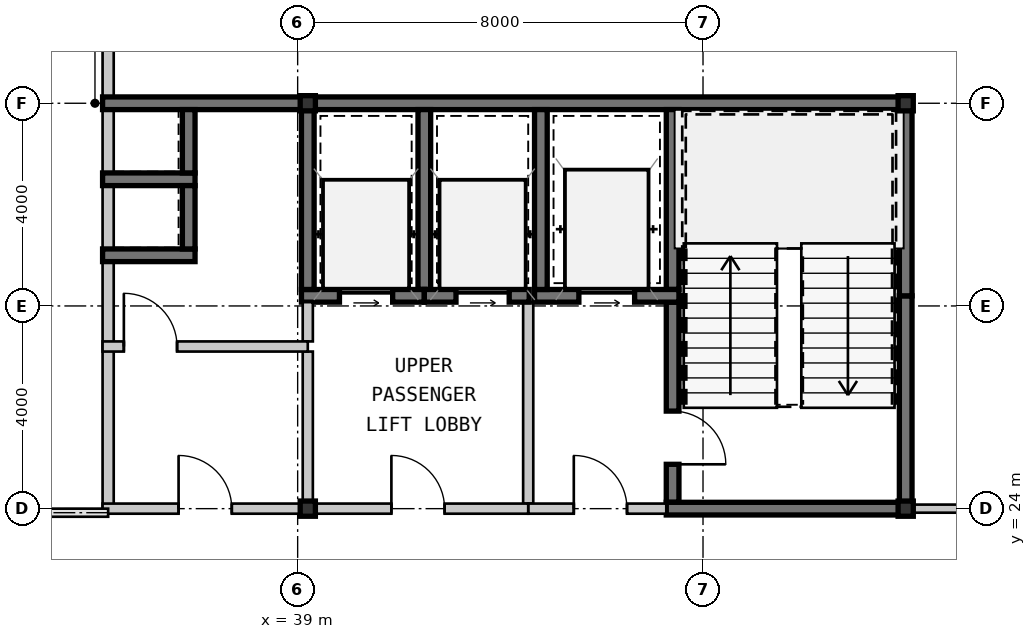
"""IFC4 building model, lengths in metres.
Left out: names, types, materials, properties, quantities, classifications, styles, units other than length and angle.
Written with IfcOpenShell. Run it as: python <this file> out.ifc"""

import sys

from ifc_helpers import new_model, si_unit, direction, frame, frame_2d, origin, origin_2d, place, context, subcontext, project, spatial, rectangle, hollow_rectangle, extrude, source, transform, mapped, element, fill, save


model = new_model("IFC4")
c1 = context("Model", 3, precision=1e-05, world=origin(), true_north=direction((0.0, 1.0)))
c2 = subcontext(c1, "Body", "Model", "MODEL_VIEW")
j1 = project(units=[si_unit("LENGTHUNIT", "METRE"), si_unit("PLANEANGLEUNIT", "RADIAN")], contexts=[c1])
p1 = place(None, origin())
s1 = spatial("IfcSite", under=j1, at=p1, CompositionType="ELEMENT")
p2 = place(p1, origin())
s2 = spatial("IfcBuilding", under=s1, at=p2, CompositionType="ELEMENT")
p3 = place(p2, frame((0.0, 0.0, 227.15)))
s3 = spatial("IfcBuildingStorey", under=s2, at=p3, CompositionType="ELEMENT", Elevation=227.15)
m1 = source(origin(), c2, "Body", "SweptSolid", [
    extrude(hollow_rectangle(XDim=0.3, YDim=0.3, WallThickness=0.012, at=origin_2d()), origin(), (0.0, 0.0, 1.0), 3.15),
])
for number, where, z_axis, x_axis in (
    (1, (39.2, 24.0, 0.0), (0.0, 0.0, 1.0), (1.0, 0.0, 0.0)),
    (2, (51.0, 24.0, 0.0), (0.0, 0.0, 1.0), (1.0, 0.0, 0.0)),
    (3, (39.2, 32.0, 0.0), (0.0, 0.0, 1.0), (1.0, 0.0, 0.0)),
    (4, (51.0, 32.0, 0.0), (0.0, 0.0, 1.0), (1.0, 0.0, 0.0)),
):
    element("IfcColumn", number, at=place(p3, frame(where, z_axis=z_axis, x_axis=x_axis)), inside=s3, PredefinedType="COLUMN", context=c2, shape_type="MappedRepresentation", body=[
        mapped(m1, transform((0.0, 0.0, 0.0), scale=1.0)),
    ])
m2 = source(origin(), c2, "Body", "SweptSolid", [
    extrude(rectangle(XDim=11.964, YDim=0.22, at=frame_2d((5.982, 0.0))), origin(), (0.0, 0.0, 1.0), 2.93),
])
p4 = place(p3, frame((35.26, 35.884, 0.0), z_axis=(0.0, 0.0, 1.0), x_axis=(0.0, -1.0, 0.0)))
e5 = element("IfcWall", 5, at=p4, inside=s3, PredefinedType="SOLIDWALL", context=c2, shape_type="MappedRepresentation", body=[
    mapped(m2, transform((0.0, 0.0, 0.0), scale=1.0)),
])
m3 = source(origin(), c2, "Body", "SweptSolid", [
    extrude(rectangle(XDim=4.05, YDim=0.25, at=frame_2d((2.025, 0.0))), origin(), (0.0, 0.0, 1.0), 2.93),
])
p5 = place(p3, frame((35.15, 32.0, 0.0), z_axis=(0.0, 0.0, 1.0), x_axis=(1.0, 0.0, 0.0)))
e6 = element("IfcWall", 6, at=p5, inside=s3, PredefinedType="SHEAR", context=c2, shape_type="MappedRepresentation", body=[
    mapped(m3, transform((0.0, 0.0, 0.0), scale=1.0)),
])
m4 = source(origin(), c2, "Body", "SweptSolid", [
    extrude(rectangle(XDim=11.925, YDim=0.25, at=frame_2d((5.962, 0.0))), origin(), (0.0, 0.0, 1.0), 2.93),
])
p6 = place(p3, frame((39.2, 32.0, 0.0), z_axis=(0.0, 0.0, 1.0), x_axis=(1.0, 0.0, 0.0)))
e7 = element("IfcWall", 7, at=p6, inside=s3, PredefinedType="SHEAR", context=c2, shape_type="MappedRepresentation", body=[
    mapped(m4, transform((0.0, 0.0, 0.0), scale=1.0)),
])
m5 = source(origin(), c2, "Body", "SweptSolid", [
    extrude(rectangle(XDim=4.075, YDim=0.25, at=frame_2d((2.038, 0.0))), origin(), (0.0, 0.0, 1.0), 2.93),
])
p7 = place(p3, frame((51.0, 24.125, 0.0), z_axis=(0.0, 0.0, 1.0), x_axis=(0.0, 1.0, 0.0)))
e8 = element("IfcWall", 8, at=p7, inside=s3, PredefinedType="SHEAR", context=c2, shape_type="MappedRepresentation", body=[
    mapped(m5, transform((0.0, 0.0, 0.0), scale=1.0)),
])
m6 = source(origin(), c2, "Body", "SweptSolid", [
    extrude(rectangle(XDim=3.675, YDim=0.25, at=frame_2d((1.837, 0.0))), origin(), (0.0, 0.0, 1.0), 2.93),
])
p8 = place(p3, frame((51.0, 28.2, 0.0), z_axis=(0.0, 0.0, 1.0), x_axis=(0.0, 1.0, 0.0)))
e9 = element("IfcWall", 9, at=p8, inside=s3, PredefinedType="SHEAR", context=c2, shape_type="MappedRepresentation", body=[
    mapped(m6, transform((0.0, 0.0, 0.0), scale=1.0)),
])
m7 = source(origin(), c2, "Body", "SweptSolid", [
    extrude(rectangle(XDim=3.55, YDim=0.25, at=frame_2d((1.775, 0.0))), origin(), (0.0, 0.0, 1.0), 2.93),
])
p9 = place(p3, frame((46.4, 31.875, 0.0), z_axis=(0.0, 0.0, 1.0), x_axis=(0.0, -1.0, 0.0)))
e10 = element("IfcWall", 10, at=p9, inside=s3, PredefinedType="SHEAR", context=c2, shape_type="MappedRepresentation", body=[
    mapped(m7, transform((0.0, 0.0, 0.0), scale=1.0)),
])
m8 = source(origin(), c2, "Body", "SweptSolid", [
    extrude(rectangle(XDim=3.95, YDim=0.25, at=frame_2d((1.975, 0.0))), origin(), (0.0, 0.0, 1.0), 2.93),
])
p10 = place(p3, frame((46.4, 28.075, 0.0), z_axis=(0.0, 0.0, 1.0), x_axis=(0.0, -1.0, 0.0)))
e11 = element("IfcWall", 11, at=p10, inside=s3, PredefinedType="SHEAR", context=c2, shape_type="MappedRepresentation", body=[
    mapped(m8, transform((0.0, 0.0, 0.0), scale=1.0)),
])
m9 = source(origin(), c2, "Body", "SweptSolid", [
    extrude(rectangle(XDim=1.05, YDim=2.1, at=frame_2d((0.525, 1.05))), frame((0.0, 0.135, 0.0), z_axis=(0.0, -1.0, 0.0), x_axis=(1.0, 0.0, 0.0)), (0.0, 0.0, 1.0), 0.27),
])
p11 = place(p10, frame((2.15, 0.0, 0.0)))
e12 = element("IfcOpeningElement", 12, at=p11, cuts=e11, PredefinedType="OPENING", context=c2, shape_type="MappedRepresentation", body=[
    mapped(m9, transform((0.0, 0.0, 0.0), scale=1.0)),
])
m10 = source(origin(), c2, "Body", "SweptSolid", [
    extrude(rectangle(XDim=4.85, YDim=0.25, at=frame_2d((2.425, 0.0))), origin(), (0.0, 0.0, 1.0), 2.93),
])
p12 = place(p3, frame((46.275, 24.0, 0.0), z_axis=(0.0, 0.0, 1.0), x_axis=(1.0, 0.0, 0.0)))
e13 = element("IfcWall", 13, at=p12, inside=s3, PredefinedType="SHEAR", context=c2, shape_type="MappedRepresentation", body=[
    mapped(m10, transform((0.0, 0.0, 0.0), scale=1.0)),
])
m11 = source(origin(), c2, "Body", "SweptSolid", [
    extrude(rectangle(XDim=2.85, YDim=0.25, at=frame_2d((1.425, 0.0))), origin(), (0.0, 0.0, 1.0), 2.93),
])
p13 = place(p3, frame((43.675, 28.2, 0.0), z_axis=(0.0, 0.0, 1.0), x_axis=(1.0, 0.0, 0.0)))
e14 = element("IfcWall", 14, at=p13, inside=s3, PredefinedType="SHEAR", context=c2, shape_type="MappedRepresentation", body=[
    mapped(m11, transform((0.0, 0.0, 0.0), scale=1.0)),
])
m12 = source(origin(), c2, "Body", "SweptSolid", [
    extrude(rectangle(XDim=1.1, YDim=2.15, at=frame_2d((0.55, 1.075))), frame((0.0, 0.135, 0.0), z_axis=(0.0, -1.0, 0.0), x_axis=(1.0, 0.0, 0.0)), (0.0, 0.0, 1.0), 0.27),
])
p14 = place(p13, frame((0.875, 0.0, 0.0)))
e15 = element("IfcOpeningElement", 15, at=p14, cuts=e14, PredefinedType="OPENING", context=c2, shape_type="MappedRepresentation", body=[
    mapped(m12, transform((0.0, 0.0, 0.0), scale=1.0)),
])
p15 = place(p3, frame((43.8, 31.875, 0.0), z_axis=(0.0, 0.0, 1.0), x_axis=(0.0, -1.0, 0.0)))
e16 = element("IfcWall", 16, at=p15, inside=s3, PredefinedType="SHEAR", context=c2, shape_type="MappedRepresentation", body=[
    mapped(m7, transform((0.0, 0.0, 0.0), scale=1.0)),
])
m13 = source(origin(), c2, "Body", "SweptSolid", [
    extrude(rectangle(XDim=3.975, YDim=0.2, at=frame_2d((1.987, 0.0))), origin(), (0.0, 0.0, 1.0), 2.93),
])
p16 = place(p3, frame((43.55, 28.075, 0.0), z_axis=(0.0, 0.0, 1.0), x_axis=(0.0, -1.0, 0.0)))
e17 = element("IfcWall", 17, at=p16, inside=s3, PredefinedType="SOLIDWALL", context=c2, shape_type="MappedRepresentation", body=[
    mapped(m13, transform((0.0, 0.0, 0.0), scale=1.0)),
])
m14 = source(origin(), c2, "Body", "SweptSolid", [
    extrude(rectangle(XDim=2.725, YDim=0.2, at=frame_2d((1.362, 0.0))), origin(), (0.0, 0.0, 1.0), 2.397),
])
p17 = place(p3, frame((43.55, 24.0, 0.0), z_axis=(0.0, 0.0, 1.0), x_axis=(1.0, 0.0, 0.0)))
e18 = element("IfcWall", 18, at=p17, inside=s3, PredefinedType="SOLIDWALL", context=c2, shape_type="MappedRepresentation", body=[
    mapped(m14, transform((0.0, 0.0, 0.0), scale=1.0)),
])
m15 = source(origin(), c2, "Body", "SweptSolid", [
    extrude(rectangle(XDim=1.05, YDim=2.1, at=frame_2d((0.525, 1.05))), frame((0.0, 0.11, 0.0), z_axis=(0.0, -1.0, 0.0), x_axis=(1.0, 0.0, 0.0)), (0.0, 0.0, 1.0), 0.22),
])
p18 = place(p17, frame((0.9, 0.0, 0.0)))
e19 = element("IfcOpeningElement", 19, at=p18, cuts=e18, PredefinedType="OPENING", context=c2, shape_type="MappedRepresentation", body=[
    mapped(m15, transform((0.0, 0.0, 0.0), scale=1.0)),
])
m16 = source(origin(), c2, "Body", "SweptSolid", [
    extrude(rectangle(XDim=1.825, YDim=0.25, at=frame_2d((0.913, 0.0))), origin(), (0.0, 0.0, 1.0), 2.93),
])
p19 = place(p3, frame((35.15, 30.5, 0.0), z_axis=(0.0, 0.0, 1.0), x_axis=(1.0, 0.0, 0.0)))
e20 = element("IfcWall", 20, at=p19, inside=s3, PredefinedType="SHEAR", context=c2, shape_type="MappedRepresentation", body=[
    mapped(m16, transform((0.0, 0.0, 0.0), scale=1.0)),
])
m17 = source(origin(), c2, "Body", "SweptSolid", [
    extrude(rectangle(XDim=1.25, YDim=0.25, at=frame_2d((0.625, 0.0))), origin(), (0.0, 0.0, 1.0), 2.93),
])
p20 = place(p3, frame((36.85, 30.625, 0.0), z_axis=(0.0, 0.0, 1.0), x_axis=(0.0, 1.0, 0.0)))
e21 = element("IfcWall", 21, at=p20, inside=s3, PredefinedType="SHEAR", context=c2, shape_type="MappedRepresentation", body=[
    mapped(m17, transform((0.0, 0.0, 0.0), scale=1.0)),
])
p21 = place(p3, frame((35.15, 29.0, 0.0), z_axis=(0.0, 0.0, 1.0), x_axis=(1.0, 0.0, 0.0)))
e22 = element("IfcWall", 22, at=p21, inside=s3, PredefinedType="SHEAR", context=c2, shape_type="MappedRepresentation", body=[
    mapped(m16, transform((0.0, 0.0, 0.0), scale=1.0)),
])
p22 = place(p3, frame((36.85, 29.125, 0.0), z_axis=(0.0, 0.0, 1.0), x_axis=(0.0, 1.0, 0.0)))
e23 = element("IfcWall", 23, at=p22, inside=s3, PredefinedType="SHEAR", context=c2, shape_type="MappedRepresentation", body=[
    mapped(m17, transform((0.0, 0.0, 0.0), scale=1.0)),
])
p23 = place(p3, frame((41.5, 28.325, 0.0), z_axis=(0.0, 0.0, 1.0), x_axis=(0.0, 1.0, 0.0)))
e24 = element("IfcWall", 24, at=p23, inside=s3, PredefinedType="SHEAR", context=c2, shape_type="MappedRepresentation", body=[
    mapped(m7, transform((0.0, 0.0, 0.0), scale=1.0)),
])
m18 = source(origin(), c2, "Body", "SweptSolid", [
    extrude(rectangle(XDim=2.425, YDim=0.25, at=frame_2d((1.212, 0.0))), origin(), (0.0, 0.0, 1.0), 2.93),
])
p24 = place(p3, frame((39.075, 28.2, 0.0), z_axis=(0.0, 0.0, 1.0), x_axis=(1.0, 0.0, 0.0)))
e25 = element("IfcWall", 25, at=p24, inside=s3, PredefinedType="SHEAR", context=c2, shape_type="MappedRepresentation", body=[
    mapped(m18, transform((0.0, 0.0, 0.0), scale=1.0)),
])
m19 = source(origin(), c2, "Body", "SweptSolid", [
    extrude(rectangle(XDim=1.05, YDim=2.15, at=frame_2d((0.525, 1.075))), frame((0.0, 0.135, 0.0), z_axis=(0.0, -1.0, 0.0), x_axis=(1.0, 0.0, 0.0)), (0.0, 0.0, 1.0), 0.27),
])
p25 = place(p24, frame((0.75, 0.0, 0.0)))
e26 = element("IfcOpeningElement", 26, at=p25, cuts=e25, PredefinedType="OPENING", context=c2, shape_type="MappedRepresentation", body=[
    mapped(m19, transform((0.0, 0.0, 0.0), scale=1.0)),
])
p26 = place(p3, frame((39.2, 31.875, 0.0), z_axis=(0.0, 0.0, 1.0), x_axis=(0.0, -1.0, 0.0)))
e27 = element("IfcWall", 27, at=p26, inside=s3, PredefinedType="SHEAR", context=c2, shape_type="MappedRepresentation", body=[
    mapped(m7, transform((0.0, 0.0, 0.0), scale=1.0)),
])
m20 = source(origin(), c2, "Body", "SweptSolid", [
    extrude(rectangle(XDim=2.07, YDim=0.25, at=frame_2d((1.035, 0.0))), origin(), (0.0, 0.0, 1.0), 2.93),
])
p27 = place(p3, frame((41.5, 28.2, 0.0), z_axis=(0.0, 0.0, 1.0), x_axis=(1.0, 0.0, 0.0)))
e28 = element("IfcWall", 28, at=p27, inside=s3, PredefinedType="SHEAR", context=c2, shape_type="MappedRepresentation", body=[
    mapped(m20, transform((0.0, 0.0, 0.0), scale=1.0)),
])
p28 = place(p27, frame((0.625, 0.0, 0.0)))
e29 = element("IfcOpeningElement", 29, at=p28, cuts=e28, PredefinedType="OPENING", context=c2, shape_type="MappedRepresentation", body=[
    mapped(m19, transform((0.0, 0.0, 0.0), scale=1.0)),
])
m21 = source(origin(), c2, "Body", "SweptSolid", [
    extrude(rectangle(XDim=3.0, YDim=0.2, at=frame_2d((1.5, 0.0))), origin(), (0.0, 0.0, 1.0), 2.47),
])
p29 = place(p3, frame((39.2, 24.1, 0.0), z_axis=(0.0, 0.0, 1.0), x_axis=(0.0, 1.0, 0.0)))
e30 = element("IfcWall", 30, at=p29, inside=s3, PredefinedType="SOLIDWALL", context=c2, shape_type="MappedRepresentation", body=[
    mapped(m21, transform((0.0, 0.0, 0.0), scale=1.0)),
])
m22 = source(origin(), c2, "Body", "SweptSolid", [
    extrude(rectangle(XDim=0.775, YDim=0.2, at=frame_2d((0.387, 0.0))), origin(), (0.0, 0.0, 1.0), 2.47),
])
p30 = place(p3, frame((39.2, 27.3, 0.0), z_axis=(0.0, 0.0, 1.0), x_axis=(0.0, 1.0, 0.0)))
e31 = element("IfcWall", 31, at=p30, inside=s3, PredefinedType="SOLIDWALL", context=c2, shape_type="MappedRepresentation", body=[
    mapped(m22, transform((0.0, 0.0, 0.0), scale=1.0)),
])
m23 = source(origin(), c2, "Body", "SweptSolid", [
    extrude(rectangle(XDim=4.35, YDim=0.2, at=frame_2d((2.175, 0.0))), origin(), (0.0, 0.0, 1.0), 2.397),
])
p31 = place(p3, frame((43.55, 24.0, 0.0), z_axis=(0.0, 0.0, 1.0), x_axis=(-1.0, 0.0, 0.0)))
e32 = element("IfcWall", 32, at=p31, inside=s3, PredefinedType="SOLIDWALL", context=c2, shape_type="MappedRepresentation", body=[
    mapped(m23, transform((0.0, 0.0, 0.0), scale=1.0)),
])
p32 = place(p31, frame((1.65, 0.0, 0.0)))
e33 = element("IfcOpeningElement", 33, at=p32, cuts=e32, PredefinedType="OPENING", context=c2, shape_type="MappedRepresentation", body=[
    mapped(m15, transform((0.0, 0.0, 0.0), scale=1.0)),
])
m24 = source(origin(), c2, "Body", "SweptSolid", [
    extrude(rectangle(XDim=4.05, YDim=0.2, at=frame_2d((2.025, 0.0))), origin(), (0.0, 0.0, 1.0), 2.93),
])
p33 = place(p3, frame((35.15, 27.2, 0.0), z_axis=(0.0, 0.0, 1.0), x_axis=(1.0, 0.0, 0.0)))
e34 = element("IfcWall", 34, at=p33, inside=s3, PredefinedType="SOLIDWALL", context=c2, shape_type="MappedRepresentation", body=[
    mapped(m24, transform((0.0, 0.0, 0.0), scale=1.0)),
])
p34 = place(p33, frame((0.42, 0.0, 0.0)))
e35 = element("IfcOpeningElement", 35, at=p34, cuts=e34, PredefinedType="OPENING", context=c2, shape_type="MappedRepresentation", body=[
    mapped(m15, transform((0.0, 0.0, 0.0), scale=1.0)),
])
m25 = source(origin(), c2, "Body", "SweptSolid", [
    extrude(rectangle(XDim=4.05, YDim=0.2, at=frame_2d((2.025, 0.0))), origin(), (0.0, 0.0, 1.0), 2.23),
])
p35 = place(p3, frame((39.2, 24.0, 0.0), z_axis=(0.0, 0.0, 1.0), x_axis=(-1.0, 0.0, 0.0)))
e36 = element("IfcWall", 36, at=p35, inside=s3, PredefinedType="SOLIDWALL", context=c2, shape_type="MappedRepresentation", body=[
    mapped(m25, transform((0.0, 0.0, 0.0), scale=1.0)),
])
p36 = place(p35, frame((1.5, 0.0, 0.0)))
e37 = element("IfcOpeningElement", 37, at=p36, cuts=e36, PredefinedType="OPENING", context=c2, shape_type="MappedRepresentation", body=[
    mapped(m15, transform((0.0, 0.0, 0.0), scale=1.0)),
])
m26 = source(origin(), c2, "Body", "SweptSolid", [
    extrude(rectangle(XDim=6.378, YDim=0.16, at=frame_2d((3.189, 0.0))), origin(), (0.0, 0.0, 1.0), 2.93),
])
p37 = place(p3, frame((51.125, 24.0, 0.0), z_axis=(0.0, 0.0, 1.0), x_axis=(1.0, 0.0, 0.0)))
e38 = element("IfcWall", 38, at=p37, inside=s3, PredefinedType="PARTITIONING", context=c2, shape_type="MappedRepresentation", body=[
    mapped(m26, transform((0.0, 0.0, 0.0), scale=1.0)),
])
m27 = source(origin(), c2, "Body", "SweptSolid", [
    extrude(rectangle(XDim=0.92, YDim=2.1, at=frame_2d((0.46, 1.05))), frame((0.0, 0.09, 0.0), z_axis=(0.0, -1.0, 0.0), x_axis=(1.0, 0.0, 0.0)), (0.0, 0.0, 1.0), 0.18),
])
p38 = place(p37, frame((2.677, 0.0, 0.0)))
e39 = element("IfcOpeningElement", 39, at=p38, cuts=e38, PredefinedType="OPENING", context=c2, shape_type="MappedRepresentation", body=[
    mapped(m27, transform((0.0, 0.0, 0.0), scale=1.0)),
])
m28 = source(origin(), c2, "Body", "SweptSolid", [
    extrude(rectangle(XDim=1.05, YDim=2.1, at=frame_2d((0.525, 1.05))), frame((0.0, 0.025, 0.0), z_axis=(0.0, -1.0, 0.0), x_axis=(1.0, 0.0, 0.0)), (0.0, 0.0, 1.0), 0.05),
])
p39 = place(p11, origin())
e40 = element("IfcDoor", 40, at=p39, inside=s3, OperationType="SINGLE_SWING_RIGHT", PredefinedType="DOOR", context=c2, shape_type="MappedRepresentation", body=[
    mapped(m28, transform((0.0, 0.0, 0.0), scale=1.0)),
])
fill(e12, e40)
m29 = source(origin(), c2, "Body", "SweptSolid", [
    extrude(rectangle(XDim=1.1, YDim=2.15, at=frame_2d((0.55, 1.075))), frame((0.0, 0.025, 0.0), z_axis=(0.0, -1.0, 0.0), x_axis=(1.0, 0.0, 0.0)), (0.0, 0.0, 1.0), 0.05),
])
p40 = place(p14, origin())
e41 = element("IfcDoor", 41, at=p40, inside=s3, OperationType="SLIDING_TO_LEFT", PredefinedType="DOOR", context=c2, shape_type="MappedRepresentation", body=[
    mapped(m29, transform((0.0, 0.0, 0.0), scale=1.0)),
])
fill(e15, e41)
p41 = place(p18, origin())
e42 = element("IfcDoor", 42, at=p41, inside=s3, OperationType="SINGLE_SWING_LEFT", PredefinedType="DOOR", context=c2, shape_type="MappedRepresentation", body=[
    mapped(m28, transform((0.0, 0.0, 0.0), scale=1.0)),
])
fill(e19, e42)
m30 = source(origin(), c2, "Body", "SweptSolid", [
    extrude(rectangle(XDim=1.05, YDim=2.15, at=frame_2d((0.525, 1.075))), frame((0.0, 0.025, 0.0), z_axis=(0.0, -1.0, 0.0), x_axis=(1.0, 0.0, 0.0)), (0.0, 0.0, 1.0), 0.05),
])
p42 = place(p25, origin())
e43 = element("IfcDoor", 43, at=p42, inside=s3, OperationType="SLIDING_TO_LEFT", PredefinedType="DOOR", context=c2, shape_type="MappedRepresentation", body=[
    mapped(m30, transform((0.0, 0.0, 0.0), scale=1.0)),
])
fill(e26, e43)
p43 = place(p28, origin())
e44 = element("IfcDoor", 44, at=p43, inside=s3, OperationType="SLIDING_TO_LEFT", PredefinedType="DOOR", context=c2, shape_type="MappedRepresentation", body=[
    mapped(m30, transform((0.0, 0.0, 0.0), scale=1.0)),
])
fill(e29, e44)
p44 = place(p32, frame((1.05, 0.0, 0.0), z_axis=(0.0, 0.0, 1.0), x_axis=(-1.0, 0.0, 0.0)))
e45 = element("IfcDoor", 45, at=p44, inside=s3, OperationType="SINGLE_SWING_LEFT", PredefinedType="DOOR", context=c2, shape_type="MappedRepresentation", body=[
    mapped(m28, transform((0.0, 0.0, 0.0), scale=1.0)),
])
fill(e33, e45)
p45 = place(p34, origin())
e46 = element("IfcDoor", 46, at=p45, inside=s3, OperationType="SINGLE_SWING_LEFT", PredefinedType="DOOR", context=c2, shape_type="MappedRepresentation", body=[
    mapped(m28, transform((0.0, 0.0, 0.0), scale=1.0)),
])
fill(e35, e46)
p46 = place(p36, frame((1.05, 0.0, 0.0), z_axis=(0.0, 0.0, 1.0), x_axis=(-1.0, 0.0, 0.0)))
e47 = element("IfcDoor", 47, at=p46, inside=s3, OperationType="SINGLE_SWING_LEFT", PredefinedType="DOOR", context=c2, shape_type="MappedRepresentation", body=[
    mapped(m28, transform((0.0, 0.0, 0.0), scale=1.0)),
])
fill(e37, e47)
save(model, sys.argv[1])
